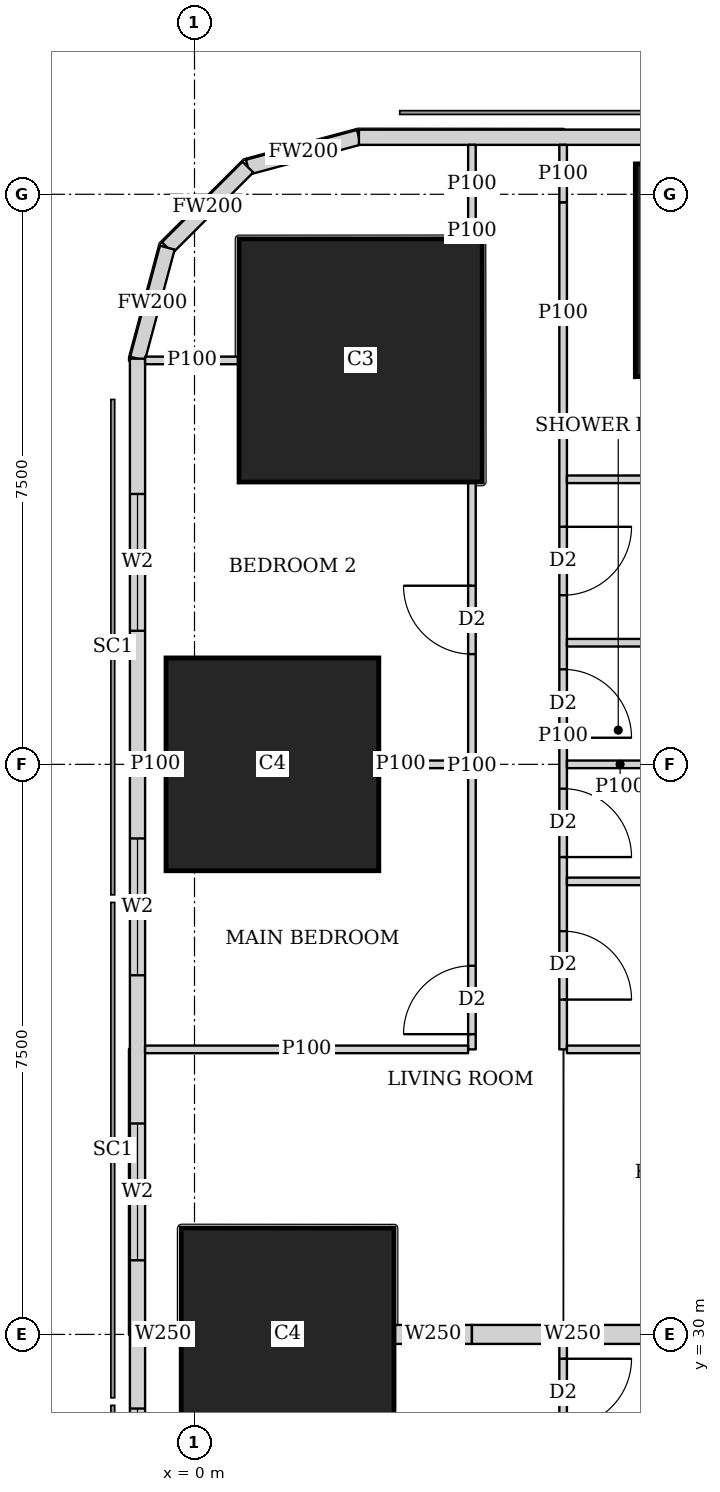
"""IFC4 building model, lengths in metres.
Left out: names, types, materials, properties, quantities, classifications, styles, units other than length and angle.
Written with IfcOpenShell. Run it as: python <this file> out.ifc"""

import sys

from ifc_helpers import new_model, si_unit, direction, frame, frame_2d, origin, origin_2d, place, context, subcontext, project, spatial, rectangle, extrude, element, fill, save


model = new_model("IFC4")
c1 = context("Model", 3, precision=1e-05, world=origin(), true_north=direction((0.0, 1.0)))
c2 = subcontext(c1, "Body", "Model", "MODEL_VIEW")
j1 = project(units=[si_unit("LENGTHUNIT", "METRE"), si_unit("PLANEANGLEUNIT", "RADIAN")], contexts=[c1])
p1 = place(None, origin())
s1 = spatial("IfcSite", under=j1, at=p1, CompositionType="ELEMENT")
p2 = place(p1, origin())
s2 = spatial("IfcBuilding", under=s1, at=p2, CompositionType="ELEMENT")
p3 = place(p2, frame((0.0, 0.0, 53.75)))
s3 = spatial("IfcBuildingStorey", under=s2, at=p3, CompositionType="ELEMENT", Elevation=53.75)
for number, where, z_axis, x_axis in (
    (1, (1.225, 30.0, 0.0), (0.0, 0.0, 1.0), (1.0, 0.0, 0.0)),
    (2, (1.025, 37.5, 0.0), (0.0, 0.0, 1.0), (1.0, 0.0, 0.0)),
):
    element("IfcColumn", number, at=place(p3, frame(where, z_axis=z_axis, x_axis=x_axis)), inside=s3, PredefinedType="COLUMN", context=c2, shape_type="SweptSolid", body=[
        extrude(rectangle(XDim=2.8, YDim=2.8, at=origin_2d()), origin(), (0.0, 0.0, 1.0), 3.75),
    ])
p4 = place(p3, frame((2.186, 42.814, 0.0), z_axis=(0.0, 0.0, 1.0), x_axis=(1.0, 0.0, 0.0)))
e3 = element("IfcColumn", 3, at=p4, inside=s3, PredefinedType="COLUMN", context=c2, shape_type="SweptSolid", body=[
    extrude(rectangle(XDim=3.2, YDim=3.2, at=origin_2d()), origin(), (0.0, 0.0, 1.0), 3.75),
])
p5 = place(p3, frame((7.2, 44.0, 0.0), z_axis=(0.0, 0.0, 1.0), x_axis=(1.0, 0.0, 0.0)))
e4 = element("IfcColumn", 4, at=p5, inside=s3, PredefinedType="COLUMN", context=c2, shape_type="SweptSolid", body=[
    extrude(rectangle(XDim=2.8, YDim=2.8, at=origin_2d()), origin(), (0.0, 0.0, 1.0), 3.75),
])
p6 = place(p3, frame((40.106, 45.75, 0.0), z_axis=(0.0, 0.0, 1.0), x_axis=(-1.0, 0.0, 0.0)))
e5 = element("IfcWall", 5, at=p6, inside=s3, PredefinedType="SOLIDWALL", context=c2, shape_type="SweptSolid", body=[
    extrude(rectangle(XDim=37.943, YDim=0.2, at=frame_2d((18.971, 0.0))), origin(), (0.0, 0.0, 1.0), 3.5),
])
p7 = place(p6, frame((8.606, 0.0, 0.9)))
e6 = element("IfcOpeningElement", 6, at=p7, cuts=e5, PredefinedType="OPENING", context=c2, shape_type="SweptSolid", body=[
    extrude(rectangle(XDim=1.8, YDim=1.5, at=frame_2d((0.9, 0.75))), frame((0.0, 0.11, 0.0), z_axis=(0.0, -1.0, 0.0), x_axis=(1.0, 0.0, 0.0)), (0.0, 0.0, 1.0), 0.22),
])
p8 = place(p6, frame((12.206, 0.0, 0.9)))
e7 = element("IfcOpeningElement", 7, at=p8, cuts=e5, PredefinedType="OPENING", context=c2, shape_type="SweptSolid", body=[
    extrude(rectangle(XDim=1.8, YDim=1.5, at=frame_2d((0.9, 0.75))), frame((0.0, 0.11, 0.0), z_axis=(0.0, -1.0, 0.0), x_axis=(1.0, 0.0, 0.0)), (0.0, 0.0, 1.0), 0.22),
])
p9 = place(p6, frame((15.806, 0.0, 0.9)))
e8 = element("IfcOpeningElement", 8, at=p9, cuts=e5, PredefinedType="OPENING", context=c2, shape_type="SweptSolid", body=[
    extrude(rectangle(XDim=1.8, YDim=1.5, at=frame_2d((0.9, 0.75))), frame((0.0, 0.11, 0.0), z_axis=(0.0, -1.0, 0.0), x_axis=(1.0, 0.0, 0.0)), (0.0, 0.0, 1.0), 0.22),
])
p10 = place(p6, frame((19.406, 0.0, 0.9)))
e9 = element("IfcOpeningElement", 9, at=p10, cuts=e5, PredefinedType="OPENING", context=c2, shape_type="SweptSolid", body=[
    extrude(rectangle(XDim=1.8, YDim=1.5, at=frame_2d((0.9, 0.75))), frame((0.0, 0.11, 0.0), z_axis=(0.0, -1.0, 0.0), x_axis=(1.0, 0.0, 0.0)), (0.0, 0.0, 1.0), 0.22),
])
p11 = place(p6, frame((23.006, 0.0, 0.9)))
e10 = element("IfcOpeningElement", 10, at=p11, cuts=e5, PredefinedType="OPENING", context=c2, shape_type="SweptSolid", body=[
    extrude(rectangle(XDim=1.8, YDim=1.5, at=frame_2d((0.9, 0.75))), frame((0.0, 0.11, 0.0), z_axis=(0.0, -1.0, 0.0), x_axis=(1.0, 0.0, 0.0)), (0.0, 0.0, 1.0), 0.22),
])
p12 = place(p6, frame((26.606, 0.0, 0.9)))
e11 = element("IfcOpeningElement", 11, at=p12, cuts=e5, PredefinedType="OPENING", context=c2, shape_type="SweptSolid", body=[
    extrude(rectangle(XDim=1.8, YDim=1.5, at=frame_2d((0.9, 0.75))), frame((0.0, 0.11, 0.0), z_axis=(0.0, -1.0, 0.0), x_axis=(1.0, 0.0, 0.0)), (0.0, 0.0, 1.0), 0.22),
])
p13 = place(p3, frame((2.163, 45.75, 0.0), z_axis=(0.0, 0.0, 1.0), x_axis=(-0.965832000415, -0.259168954497, 0.0)))
e12 = element("IfcWall", 12, at=p13, inside=s3, PredefinedType="SOLIDWALL", context=c2, shape_type="SweptSolid", body=[
    extrude(rectangle(XDim=1.513, YDim=0.2, at=frame_2d((0.756, 0.0))), origin(), (0.0, 0.0, 1.0), 3.5),
])
p14 = place(p3, frame((0.702, 45.358, 0.0), z_axis=(0.0, 0.0, 1.0), x_axis=(-0.707106781187, -0.707106781187, 0.0)))
e13 = element("IfcWall", 13, at=p14, inside=s3, PredefinedType="SOLIDWALL", context=c2, shape_type="SweptSolid", body=[
    extrude(rectangle(XDim=1.499, YDim=0.2, at=frame_2d((0.75, 0.0))), origin(), (0.0, 0.0, 1.0), 3.5),
])
p15 = place(p3, frame((-0.358, 44.298, 0.0), z_axis=(0.0, 0.0, 1.0), x_axis=(-0.259168954497, -0.965832000415, 0.0)))
e14 = element("IfcWall", 14, at=p15, inside=s3, PredefinedType="SOLIDWALL", context=c2, shape_type="SweptSolid", body=[
    extrude(rectangle(XDim=1.513, YDim=0.2, at=frame_2d((0.756, 0.0))), origin(), (0.0, 0.0, 1.0), 3.5),
])
p16 = place(p3, frame((-0.75, 42.837, 0.0), z_axis=(0.0, 0.0, 1.0), x_axis=(0.0, -1.0, 0.0)))
e15 = element("IfcWall", 15, at=p16, inside=s3, PredefinedType="SOLIDWALL", context=c2, shape_type="SweptSolid", body=[
    extrude(rectangle(XDim=40.674, YDim=0.2, at=frame_2d((20.337, 0.0))), origin(), (0.0, 0.0, 1.0), 3.5),
])
p17 = place(p16, frame((1.78, 0.0, 0.9)))
e16 = element("IfcOpeningElement", 16, at=p17, cuts=e15, PredefinedType="OPENING", context=c2, shape_type="SweptSolid", body=[
    extrude(rectangle(XDim=1.8, YDim=1.5, at=frame_2d((0.9, 0.75))), frame((0.0, 0.11, 0.0), z_axis=(0.0, -1.0, 0.0), x_axis=(1.0, 0.0, 0.0)), (0.0, 0.0, 1.0), 0.22),
])
p18 = place(p16, frame((6.312, 0.0, 0.9)))
e17 = element("IfcOpeningElement", 17, at=p18, cuts=e15, PredefinedType="OPENING", context=c2, shape_type="SweptSolid", body=[
    extrude(rectangle(XDim=1.8, YDim=1.5, at=frame_2d((0.9, 0.75))), frame((0.0, 0.11, 0.0), z_axis=(0.0, -1.0, 0.0), x_axis=(1.0, 0.0, 0.0)), (0.0, 0.0, 1.0), 0.22),
])
p19 = place(p16, frame((10.062, 0.0, 0.9)))
e18 = element("IfcOpeningElement", 18, at=p19, cuts=e15, PredefinedType="OPENING", context=c2, shape_type="SweptSolid", body=[
    extrude(rectangle(XDim=1.8, YDim=1.5, at=frame_2d((0.9, 0.75))), frame((0.0, 0.11, 0.0), z_axis=(0.0, -1.0, 0.0), x_axis=(1.0, 0.0, 0.0)), (0.0, 0.0, 1.0), 0.22),
])
p20 = place(p16, frame((13.812, 0.0, 0.9)))
e19 = element("IfcOpeningElement", 19, at=p20, cuts=e15, PredefinedType="OPENING", context=c2, shape_type="SweptSolid", body=[
    extrude(rectangle(XDim=1.8, YDim=1.5, at=frame_2d((0.9, 0.75))), frame((0.0, 0.11, 0.0), z_axis=(0.0, -1.0, 0.0), x_axis=(1.0, 0.0, 0.0)), (0.0, 0.0, 1.0), 0.22),
])
p21 = place(p16, frame((17.562, 0.0, 0.9)))
e20 = element("IfcOpeningElement", 20, at=p21, cuts=e15, PredefinedType="OPENING", context=c2, shape_type="SweptSolid", body=[
    extrude(rectangle(XDim=1.8, YDim=1.5, at=frame_2d((0.9, 0.75))), frame((0.0, 0.11, 0.0), z_axis=(0.0, -1.0, 0.0), x_axis=(1.0, 0.0, 0.0)), (0.0, 0.0, 1.0), 0.22),
])
p22 = place(p16, frame((21.312, 0.0, 0.9)))
e21 = element("IfcOpeningElement", 21, at=p22, cuts=e15, PredefinedType="OPENING", context=c2, shape_type="SweptSolid", body=[
    extrude(rectangle(XDim=1.8, YDim=1.5, at=frame_2d((0.9, 0.75))), frame((0.0, 0.11, 0.0), z_axis=(0.0, -1.0, 0.0), x_axis=(1.0, 0.0, 0.0)), (0.0, 0.0, 1.0), 0.22),
])
p23 = place(p16, frame((25.062, 0.0, 0.9)))
e22 = element("IfcOpeningElement", 22, at=p23, cuts=e15, PredefinedType="OPENING", context=c2, shape_type="SweptSolid", body=[
    extrude(rectangle(XDim=1.8, YDim=1.5, at=frame_2d((0.9, 0.75))), frame((0.0, 0.11, 0.0), z_axis=(0.0, -1.0, 0.0), x_axis=(1.0, 0.0, 0.0)), (0.0, 0.0, 1.0), 0.22),
])
p24 = place(p16, frame((28.812, 0.0, 0.9)))
e23 = element("IfcOpeningElement", 23, at=p24, cuts=e15, PredefinedType="OPENING", context=c2, shape_type="SweptSolid", body=[
    extrude(rectangle(XDim=1.8, YDim=1.5, at=frame_2d((0.9, 0.75))), frame((0.0, 0.11, 0.0), z_axis=(0.0, -1.0, 0.0), x_axis=(1.0, 0.0, 0.0)), (0.0, 0.0, 1.0), 0.22),
])
p25 = place(p16, frame((32.562, 0.0, 0.9)))
e24 = element("IfcOpeningElement", 24, at=p25, cuts=e15, PredefinedType="OPENING", context=c2, shape_type="SweptSolid", body=[
    extrude(rectangle(XDim=1.8, YDim=1.5, at=frame_2d((0.9, 0.75))), frame((0.0, 0.11, 0.0), z_axis=(0.0, -1.0, 0.0), x_axis=(1.0, 0.0, 0.0)), (0.0, 0.0, 1.0), 0.22),
])
p26 = place(p16, frame((37.094, 0.0, 0.9)))
e25 = element("IfcOpeningElement", 25, at=p26, cuts=e15, PredefinedType="OPENING", context=c2, shape_type="SweptSolid", body=[
    extrude(rectangle(XDim=1.8, YDim=1.5, at=frame_2d((0.9, 0.75))), frame((0.0, 0.11, 0.0), z_axis=(0.0, -1.0, 0.0), x_axis=(1.0, 0.0, 0.0)), (0.0, 0.0, 1.0), 0.22),
])
p27 = place(p3, frame((4.85, 26.25, 0.0), z_axis=(0.0, 0.0, 1.0), x_axis=(0.0, 1.0, 0.0)))
e26 = element("IfcWall", 26, at=p27, inside=s3, PredefinedType="PARTITIONING", context=c2, shape_type="SweptSolid", body=[
    extrude(rectangle(XDim=3.625, YDim=0.1, at=frame_2d((1.812, 0.0))), origin(), (0.0, 0.0, 1.0), 3.5),
])
p28 = place(p27, frame((0.655, 0.0, 0.0)))
e27 = element("IfcOpeningElement", 27, at=p28, cuts=e26, PredefinedType="OPENING", context=c2, shape_type="SweptSolid", body=[
    extrude(rectangle(XDim=0.9, YDim=2.1, at=frame_2d((0.45, 1.05))), frame((0.0, 0.06, 0.0), z_axis=(0.0, -1.0, 0.0), x_axis=(1.0, 0.0, 0.0)), (0.0, 0.0, 1.0), 0.12),
])
p29 = place(p27, frame((2.53, 0.0, 0.0)))
e28 = element("IfcOpeningElement", 28, at=p29, cuts=e26, PredefinedType="OPENING", context=c2, shape_type="SweptSolid", body=[
    extrude(rectangle(XDim=0.9, YDim=2.1, at=frame_2d((0.45, 1.05))), frame((0.0, 0.06, 0.0), z_axis=(0.0, -1.0, 0.0), x_axis=(1.0, 0.0, 0.0)), (0.0, 0.0, 1.0), 0.12),
])
p30 = place(p3, frame((3.65, 33.75, 0.0), z_axis=(0.0, 0.0, 1.0), x_axis=(0.0, 1.0, 0.0)))
e29 = element("IfcWall", 29, at=p30, inside=s3, PredefinedType="PARTITIONING", context=c2, shape_type="SweptSolid", body=[
    extrude(rectangle(XDim=7.463, YDim=0.1, at=frame_2d((3.731, 0.0))), origin(), (0.0, 0.0, 1.0), 3.5),
])
p31 = place(p30, frame((0.2, 0.0, 0.0)))
e30 = element("IfcOpeningElement", 30, at=p31, cuts=e29, PredefinedType="OPENING", context=c2, shape_type="SweptSolid", body=[
    extrude(rectangle(XDim=0.9, YDim=2.1, at=frame_2d((0.45, 1.05))), frame((0.0, 0.06, 0.0), z_axis=(0.0, -1.0, 0.0), x_axis=(1.0, 0.0, 0.0)), (0.0, 0.0, 1.0), 0.12),
])
p32 = place(p30, frame((5.2, 0.0, 0.0)))
e31 = element("IfcOpeningElement", 31, at=p32, cuts=e29, PredefinedType="OPENING", context=c2, shape_type="SweptSolid", body=[
    extrude(rectangle(XDim=0.9, YDim=2.1, at=frame_2d((0.45, 1.05))), frame((0.0, 0.06, 0.0), z_axis=(0.0, -1.0, 0.0), x_axis=(1.0, 0.0, 0.0)), (0.0, 0.0, 1.0), 0.12),
])
p33 = place(p3, frame((3.65, 44.415, 0.0), z_axis=(0.0, 0.0, 1.0), x_axis=(0.0, 1.0, 0.0)))
e32 = element("IfcWall", 32, at=p33, inside=s3, PredefinedType="PARTITIONING", context=c2, shape_type="SweptSolid", body=[
    extrude(rectangle(XDim=0.196, YDim=0.1, at=frame_2d((0.098, 0.0))), origin(), (0.0, 0.0, 1.0), 2.05),
])
p34 = place(p3, frame((3.65, 44.611, 0.0), z_axis=(0.0, 0.0, 1.0), x_axis=(0.0, 1.0, 0.0)))
e33 = element("IfcWall", 33, at=p34, inside=s3, PredefinedType="PARTITIONING", context=c2, shape_type="SweptSolid", body=[
    extrude(rectangle(XDim=1.039, YDim=0.1, at=frame_2d((0.52, 0.0))), origin(), (0.0, 0.0, 1.0), 3.5),
])
p35 = place(p3, frame((4.85, 33.75, 0.0), z_axis=(0.0, 0.0, 1.0), x_axis=(0.0, 1.0, 0.0)))
e34 = element("IfcWall", 34, at=p35, inside=s3, PredefinedType="PARTITIONING", context=c2, shape_type="SweptSolid", body=[
    extrude(rectangle(XDim=8.244, YDim=0.1, at=frame_2d((4.122, 0.0))), origin(), (0.0, 0.0, 1.0), 3.5),
])
p36 = place(p35, frame((0.655, 0.0, 0.0)))
e35 = element("IfcOpeningElement", 35, at=p36, cuts=e34, PredefinedType="OPENING", context=c2, shape_type="SweptSolid", body=[
    extrude(rectangle(XDim=0.9, YDim=2.1, at=frame_2d((0.45, 1.05))), frame((0.0, 0.06, 0.0), z_axis=(0.0, -1.0, 0.0), x_axis=(1.0, 0.0, 0.0)), (0.0, 0.0, 1.0), 0.12),
])
p37 = place(p35, frame((4.1, 0.0, 0.0)))
e36 = element("IfcOpeningElement", 36, at=p37, cuts=e34, PredefinedType="OPENING", context=c2, shape_type="SweptSolid", body=[
    extrude(rectangle(XDim=0.9, YDim=2.1, at=frame_2d((0.45, 1.05))), frame((0.0, 0.06, 0.0), z_axis=(0.0, -1.0, 0.0), x_axis=(1.0, 0.0, 0.0)), (0.0, 0.0, 1.0), 0.12),
])
p38 = place(p35, frame((2.53, 0.0, 0.0)))
e37 = element("IfcOpeningElement", 37, at=p38, cuts=e34, PredefinedType="OPENING", context=c2, shape_type="SweptSolid", body=[
    extrude(rectangle(XDim=0.9, YDim=2.1, at=frame_2d((0.45, 1.05))), frame((0.0, 0.06, 0.0), z_axis=(0.0, -1.0, 0.0), x_axis=(1.0, 0.0, 0.0)), (0.0, 0.0, 1.0), 0.12),
])
p39 = place(p35, frame((5.975, 0.0, 0.0)))
e38 = element("IfcOpeningElement", 38, at=p39, cuts=e34, PredefinedType="OPENING", context=c2, shape_type="SweptSolid", body=[
    extrude(rectangle(XDim=0.9, YDim=2.1, at=frame_2d((0.45, 1.05))), frame((0.0, 0.06, 0.0), z_axis=(0.0, -1.0, 0.0), x_axis=(1.0, 0.0, 0.0)), (0.0, 0.0, 1.0), 0.12),
])
p40 = place(p3, frame((4.85, 41.994, 0.0), z_axis=(0.0, 0.0, 1.0), x_axis=(0.0, 1.0, 0.0)))
e39 = element("IfcWall", 39, at=p40, inside=s3, PredefinedType="PARTITIONING", context=c2, shape_type="SweptSolid", body=[
    extrude(rectangle(XDim=2.901, YDim=0.1, at=frame_2d((1.451, 0.0))), origin(), (0.0, 0.0, 1.0), 2.05),
])
p41 = place(p3, frame((4.85, 44.895, 0.0), z_axis=(0.0, 0.0, 1.0), x_axis=(0.0, 1.0, 0.0)))
e40 = element("IfcWall", 40, at=p41, inside=s3, PredefinedType="PARTITIONING", context=c2, shape_type="SweptSolid", body=[
    extrude(rectangle(XDim=0.755, YDim=0.1, at=frame_2d((0.377, 0.0))), origin(), (0.0, 0.0, 1.0), 3.5),
])
p42 = place(p3, frame((-0.65, 33.75, 0.0), z_axis=(0.0, 0.0, 1.0), x_axis=(1.0, 0.0, 0.0)))
e41 = element("IfcWall", 41, at=p42, inside=s3, PredefinedType="PARTITIONING", context=c2, shape_type="SweptSolid", body=[
    extrude(rectangle(XDim=4.25, YDim=0.1, at=frame_2d((2.125, 0.0))), origin(), (0.0, 0.0, 1.0), 2.05),
])
p43 = place(p3, frame((-0.65, 37.5, 0.0), z_axis=(0.0, 0.0, 1.0), x_axis=(1.0, 0.0, 0.0)))
e42 = element("IfcWall", 42, at=p43, inside=s3, PredefinedType="PARTITIONING", context=c2, shape_type="SweptSolid", body=[
    extrude(rectangle(XDim=0.274, YDim=0.1, at=frame_2d((0.137, 0.0))), origin(), (0.0, 0.0, 1.0), 3.5),
])
p44 = place(p3, frame((2.426, 37.5, 0.0), z_axis=(0.0, 0.0, 1.0), x_axis=(1.0, 0.0, 0.0)))
e43 = element("IfcWall", 43, at=p44, inside=s3, PredefinedType="PARTITIONING", context=c2, shape_type="SweptSolid", body=[
    extrude(rectangle(XDim=1.174, YDim=0.1, at=frame_2d((0.587, 0.0))), origin(), (0.0, 0.0, 1.0), 2.05),
])
p45 = place(p3, frame((-0.65, 42.814, 0.0), z_axis=(0.0, 0.0, 1.0), x_axis=(1.0, 0.0, 0.0)))
e44 = element("IfcWall", 44, at=p45, inside=s3, PredefinedType="PARTITIONING", context=c2, shape_type="SweptSolid", body=[
    extrude(rectangle(XDim=1.235, YDim=0.1, at=frame_2d((0.617, 0.0))), origin(), (0.0, 0.0, 1.0), 3.5),
])
p46 = place(p3, frame((4.9, 33.75, 0.0), z_axis=(0.0, 0.0, 1.0), x_axis=(1.0, 0.0, 0.0)))
e45 = element("IfcWall", 45, at=p46, inside=s3, PredefinedType="PARTITIONING", context=c2, shape_type="SweptSolid", body=[
    extrude(rectangle(XDim=3.275, YDim=0.1, at=frame_2d((1.638, 0.0))), origin(), (0.0, 0.0, 1.0), 3.5),
])
p47 = place(p3, frame((4.9, 37.5, 0.0), z_axis=(0.0, 0.0, 1.0), x_axis=(1.0, 0.0, 0.0)))
e46 = element("IfcWall", 46, at=p47, inside=s3, PredefinedType="PARTITIONING", context=c2, shape_type="SweptSolid", body=[
    extrude(rectangle(XDim=1.399, YDim=0.1, at=frame_2d((0.7, 0.0))), origin(), (0.0, 0.0, 1.0), 3.5),
])
for number, where, z_axis, x_axis in (
    (47, (4.9, 41.25, 0.0), (0.0, 0.0, 1.0), (1.0, 0.0, 0.0)),
    (48, (4.9, 35.96, 0.0), (0.0, 0.0, 1.0), (1.0, 0.0, 0.0)),
    (49, (4.9, 39.1, 0.0), (0.0, 0.0, 1.0), (1.0, 0.0, 0.0)),
):
    element("IfcWall", number, at=place(p3, frame(where, z_axis=z_axis, x_axis=x_axis)), inside=s3, PredefinedType="PARTITIONING", context=c2, shape_type="SweptSolid", body=[
        extrude(rectangle(XDim=3.275, YDim=0.1, at=frame_2d((1.638, 0.0))), origin(), (0.0, 0.0, 1.0), 3.5),
    ])
p48 = place(p3, frame((-0.65, 30.0, 0.0), z_axis=(0.0, 0.0, 1.0), x_axis=(1.0, 0.0, 0.0)))
e50 = element("IfcWall", 50, at=p48, inside=s3, PredefinedType="SOLIDWALL", context=c2, shape_type="SweptSolid", body=[
    extrude(rectangle(XDim=0.474, YDim=0.25, at=frame_2d((0.237, 0.0))), origin(), (0.0, 0.0, 1.0), 3.5),
])
p49 = place(p3, frame((2.626, 30.0, 0.0), z_axis=(0.0, 0.0, 1.0), x_axis=(1.0, 0.0, 0.0)))
e51 = element("IfcWall", 51, at=p49, inside=s3, PredefinedType="SOLIDWALL", context=c2, shape_type="SweptSolid", body=[
    extrude(rectangle(XDim=1.024, YDim=0.25, at=frame_2d((0.512, 0.0))), origin(), (0.0, 0.0, 1.0), 3.5),
])
p50 = place(p3, frame((3.65, 30.0, 0.0), z_axis=(0.0, 0.0, 1.0), x_axis=(1.0, 0.0, 0.0)))
e52 = element("IfcWall", 52, at=p50, inside=s3, PredefinedType="SOLIDWALL", context=c2, shape_type="SweptSolid", body=[
    extrude(rectangle(XDim=2.649, YDim=0.25, at=frame_2d((1.325, 0.0))), origin(), (0.0, 0.0, 1.0), 3.5),
])
p51 = place(p17, origin())
e53 = element("IfcWindow", 53, at=p51, inside=s3, PartitioningType="SINGLE_PANEL", PredefinedType="WINDOW", context=c2, shape_type="SweptSolid", body=[
    extrude(rectangle(XDim=1.8, YDim=1.5, at=frame_2d((0.9, 0.75))), frame((0.0, 0.03, 0.0), z_axis=(0.0, -1.0, 0.0), x_axis=(1.0, 0.0, 0.0)), (0.0, 0.0, 1.0), 0.06),
])
fill(e16, e53)
p52 = place(p18, origin())
e54 = element("IfcWindow", 54, at=p52, inside=s3, PartitioningType="SINGLE_PANEL", PredefinedType="WINDOW", context=c2, shape_type="SweptSolid", body=[
    extrude(rectangle(XDim=1.8, YDim=1.5, at=frame_2d((0.9, 0.75))), frame((0.0, 0.03, 0.0), z_axis=(0.0, -1.0, 0.0), x_axis=(1.0, 0.0, 0.0)), (0.0, 0.0, 1.0), 0.06),
])
fill(e17, e54)
p53 = place(p19, origin())
e55 = element("IfcWindow", 55, at=p53, inside=s3, PartitioningType="SINGLE_PANEL", PredefinedType="WINDOW", context=c2, shape_type="SweptSolid", body=[
    extrude(rectangle(XDim=1.8, YDim=1.5, at=frame_2d((0.9, 0.75))), frame((0.0, 0.03, 0.0), z_axis=(0.0, -1.0, 0.0), x_axis=(1.0, 0.0, 0.0)), (0.0, 0.0, 1.0), 0.06),
])
fill(e18, e55)
p54 = place(p20, origin())
e56 = element("IfcWindow", 56, at=p54, inside=s3, PartitioningType="SINGLE_PANEL", PredefinedType="WINDOW", context=c2, shape_type="SweptSolid", body=[
    extrude(rectangle(XDim=1.8, YDim=1.5, at=frame_2d((0.9, 0.75))), frame((0.0, 0.03, 0.0), z_axis=(0.0, -1.0, 0.0), x_axis=(1.0, 0.0, 0.0)), (0.0, 0.0, 1.0), 0.06),
])
fill(e19, e56)
p55 = place(p29, origin())
e57 = element("IfcDoor", 57, at=p55, inside=s3, OperationType="SINGLE_SWING_LEFT", PredefinedType="DOOR", context=c2, shape_type="SweptSolid", body=[
    extrude(rectangle(XDim=0.9, YDim=2.1, at=frame_2d((0.45, 1.05))), frame((0.0, 0.025, 0.0), z_axis=(0.0, -1.0, 0.0), x_axis=(1.0, 0.0, 0.0)), (0.0, 0.0, 1.0), 0.05),
])
fill(e28, e57)
p56 = place(p31, origin())
e58 = element("IfcDoor", 58, at=p56, inside=s3, OperationType="SINGLE_SWING_LEFT", PredefinedType="DOOR", context=c2, shape_type="SweptSolid", body=[
    extrude(rectangle(XDim=0.9, YDim=2.1, at=frame_2d((0.45, 1.05))), frame((0.0, 0.025, 0.0), z_axis=(0.0, -1.0, 0.0), x_axis=(1.0, 0.0, 0.0)), (0.0, 0.0, 1.0), 0.05),
])
fill(e30, e58)
p57 = place(p32, origin())
e59 = element("IfcDoor", 59, at=p57, inside=s3, OperationType="SINGLE_SWING_RIGHT", PredefinedType="DOOR", context=c2, shape_type="SweptSolid", body=[
    extrude(rectangle(XDim=0.9, YDim=2.1, at=frame_2d((0.45, 1.05))), frame((0.0, 0.025, 0.0), z_axis=(0.0, -1.0, 0.0), x_axis=(1.0, 0.0, 0.0)), (0.0, 0.0, 1.0), 0.05),
])
fill(e31, e59)
p58 = place(p36, origin())
e60 = element("IfcDoor", 60, at=p58, inside=s3, OperationType="SINGLE_SWING_RIGHT", PredefinedType="DOOR", context=c2, shape_type="SweptSolid", body=[
    extrude(rectangle(XDim=0.9, YDim=2.1, at=frame_2d((0.45, 1.05))), frame((0.0, 0.025, 0.0), z_axis=(0.0, -1.0, 0.0), x_axis=(1.0, 0.0, 0.0)), (0.0, 0.0, 1.0), 0.05),
])
fill(e35, e60)
p59 = place(p37, origin())
e61 = element("IfcDoor", 61, at=p59, inside=s3, OperationType="SINGLE_SWING_RIGHT", PredefinedType="DOOR", context=c2, shape_type="SweptSolid", body=[
    extrude(rectangle(XDim=0.9, YDim=2.1, at=frame_2d((0.45, 1.05))), frame((0.0, 0.025, 0.0), z_axis=(0.0, -1.0, 0.0), x_axis=(1.0, 0.0, 0.0)), (0.0, 0.0, 1.0), 0.05),
])
fill(e36, e61)
p60 = place(p38, origin())
e62 = element("IfcDoor", 62, at=p60, inside=s3, OperationType="SINGLE_SWING_RIGHT", PredefinedType="DOOR", context=c2, shape_type="SweptSolid", body=[
    extrude(rectangle(XDim=0.9, YDim=2.1, at=frame_2d((0.45, 1.05))), frame((0.0, 0.025, 0.0), z_axis=(0.0, -1.0, 0.0), x_axis=(1.0, 0.0, 0.0)), (0.0, 0.0, 1.0), 0.05),
])
fill(e37, e62)
p61 = place(p39, origin())
e63 = element("IfcDoor", 63, at=p61, inside=s3, OperationType="SINGLE_SWING_LEFT", PredefinedType="DOOR", context=c2, shape_type="SweptSolid", body=[
    extrude(rectangle(XDim=0.9, YDim=2.1, at=frame_2d((0.45, 1.05))), frame((0.0, 0.025, 0.0), z_axis=(0.0, -1.0, 0.0), x_axis=(1.0, 0.0, 0.0)), (0.0, 0.0, 1.0), 0.05),
])
fill(e38, e63)
save(model, sys.argv[1])
